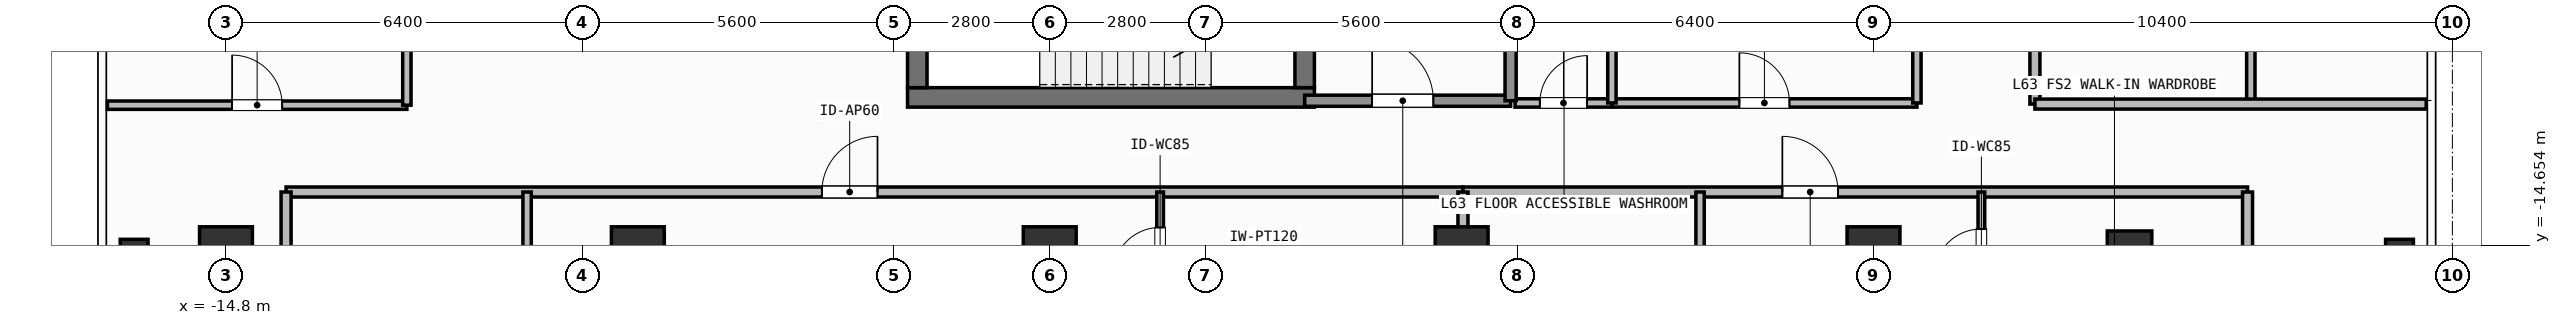
"""IFC4 building model, lengths in metres.
Left out: names, types, materials, properties, quantities, classifications, styles, units other than length and angle.
Written with IfcOpenShell. Run it as: python <this file> out.ifc"""

import sys

from ifc_helpers import new_model, si_unit, direction, frame, frame_2d, origin, origin_2d, place, context, subcontext, project, spatial, rectangle, hollow_rectangle, extrude, element, fill, save


model = new_model("IFC4")
c1 = context("Model", 3, precision=1e-05, world=origin(), true_north=direction((0.0, 1.0)))
c2 = subcontext(c1, "Body", "Model", "MODEL_VIEW")
j1 = project(units=[si_unit("LENGTHUNIT", "METRE"), si_unit("PLANEANGLEUNIT", "RADIAN")], contexts=[c1])
p1 = place(None, origin())
s1 = spatial("IfcSite", under=j1, at=p1, CompositionType="ELEMENT")
p2 = place(p1, origin())
s2 = spatial("IfcBuilding", under=s1, at=p2, CompositionType="ELEMENT")
p3 = place(p2, frame((0.0, 0.0, 258.6)))
s3 = spatial("IfcBuildingStorey", under=s2, at=p3, CompositionType="ELEMENT", Elevation=258.6)
p4 = place(p3, frame((-2.555, -12.0, 0.0), z_axis=(0.0, 0.0, 1.0), x_axis=(1.0, 0.0, 0.0)))
e1 = element("IfcWall", 1, at=p4, inside=s3, PredefinedType="SHEAR", context=c2, shape_type="SweptSolid", body=[
    extrude(rectangle(XDim=7.31, YDim=0.35, at=frame_2d((3.655, 0.0))), origin(), (0.0, 0.0, 1.0), 3.9),
])
p5 = place(p3, frame((-2.38, -11.825, 0.0), z_axis=(0.0, 0.0, 1.0), x_axis=(0.0, 1.0, 0.0)))
e2 = element("IfcWall", 2, at=p5, inside=s3, PredefinedType="SHEAR", context=c2, shape_type="SweptSolid", body=[
    extrude(rectangle(XDim=2.925, YDim=0.35, at=frame_2d((1.462, 0.0))), origin(), (0.0, 0.0, 1.0), 3.9),
])
p6 = place(p3, frame((4.58, -8.9, 0.0), z_axis=(0.0, 0.0, 1.0), x_axis=(0.0, -1.0, 0.0)))
e3 = element("IfcWall", 3, at=p6, inside=s3, PredefinedType="SHEAR", context=c2, shape_type="SweptSolid", body=[
    extrude(rectangle(XDim=2.925, YDim=0.35, at=frame_2d((1.462, 0.0))), origin(), (0.0, 0.0, 1.0), 3.9),
])
p7 = place(p6, frame((0.913, 0.0, 0.0)))
e4 = element("IfcOpeningElement", 4, at=p7, cuts=e3, PredefinedType="OPENING", context=c2, shape_type="SweptSolid", body=[
    extrude(rectangle(XDim=1.1, YDim=2.15, at=frame_2d((0.55, 1.075))), frame((0.0, 0.185, 0.0), z_axis=(0.0, -1.0, 0.0), x_axis=(1.0, 0.0, 0.0)), (0.0, 0.0, 1.0), 0.37),
])
for number, where, z_axis, x_axis in (
    (5, (-14.8, -14.8, 0.0), (0.0, 0.0, 1.0), (1.0, 0.0, 0.0)),
    (6, (-7.4, -14.8, 0.0), (0.0, 0.0, 1.0), (1.0, 0.0, 0.0)),
    (7, (0.0, -14.8, 0.0), (0.0, 0.0, 1.0), (1.0, 0.0, 0.0)),
    (8, (7.4, -14.8, 0.0), (0.0, 0.0, 1.0), (1.0, 0.0, 0.0)),
    (9, (14.8, -14.8, 0.0), (0.0, 0.0, 1.0), (1.0, 0.0, 0.0)),
):
    element("IfcColumn", number, at=place(p3, frame(where, z_axis=z_axis, x_axis=x_axis)), inside=s3, PredefinedType="COLUMN", context=c2, shape_type="SweptSolid", body=[
        extrude(rectangle(XDim=0.95, YDim=0.95, at=origin_2d()), origin(), (0.0, 0.0, 1.0), 3.9),
    ])
p8 = place(p3, frame((19.4, -14.8, 0.0), z_axis=(0.0, 0.0, 1.0), x_axis=(1.0, 0.0, 0.0)))
e10 = element("IfcColumn", 10, at=p8, inside=s3, PredefinedType="COLUMN", context=c2, shape_type="SweptSolid", body=[
    extrude(hollow_rectangle(XDim=0.8, YDim=0.8, WallThickness=0.036, at=origin_2d()), origin(), (0.0, 0.0, 1.0), 3.9),
])
for number, where, z_axis, x_axis in (
    (11, (-16.45, -14.8, 0.0), (0.0, 0.0, 1.0), (1.0, 0.0, 0.0)),
    (12, (24.25, -14.8, 0.0), (0.0, 0.0, 1.0), (1.0, 0.0, 0.0)),
):
    element("IfcColumn", number, at=place(p3, frame(where, z_axis=z_axis, x_axis=x_axis)), inside=s3, PredefinedType="COLUMN", context=c2, shape_type="SweptSolid", body=[
        extrude(hollow_rectangle(XDim=0.5, YDim=0.5, WallThickness=0.025, at=origin_2d()), origin(), (0.0, 0.0, 1.0), 3.9),
    ])
p9 = place(p3, frame((4.58, -12.06, 0.0), z_axis=(0.0, 0.0, 1.0), x_axis=(1.0, 0.0, 0.0)))
e13 = element("IfcWall", 13, at=p9, inside=s3, PredefinedType="SOLIDWALL", context=c2, shape_type="SweptSolid", body=[
    extrude(rectangle(XDim=3.7, YDim=0.2, at=frame_2d((1.85, 0.0))), origin(), (0.0, 0.0, 1.0), 3.68),
])
p10 = place(p9, frame((1.212, 0.0, 0.0)))
e14 = element("IfcOpeningElement", 14, at=p10, cuts=e13, PredefinedType="OPENING", context=c2, shape_type="SweptSolid", body=[
    extrude(rectangle(XDim=1.1, YDim=2.15, at=frame_2d((0.55, 1.075))), frame((0.0, 0.11, 0.0), z_axis=(0.0, -1.0, 0.0), x_axis=(1.0, 0.0, 0.0)), (0.0, 0.0, 1.0), 0.22),
])
p11 = place(p3, frame((8.36, -12.1, 0.0), z_axis=(0.0, 0.0, 1.0), x_axis=(1.0, 0.0, 0.0)))
e15 = element("IfcWall", 15, at=p11, inside=s3, PredefinedType="PARTITIONING", context=c2, shape_type="SweptSolid", body=[
    extrude(rectangle(XDim=1.74, YDim=0.15, at=frame_2d((0.87, 0.0))), origin(), (0.0, 0.0, 1.0), 3.68),
])
p12 = place(p11, frame((0.445, 0.0, 0.0)))
e16 = element("IfcOpeningElement", 16, at=p12, cuts=e15, PredefinedType="OPENING", context=c2, shape_type="SweptSolid", body=[
    extrude(rectangle(XDim=0.85, YDim=2.1, at=frame_2d((0.425, 1.05))), frame((0.0, 0.085, 0.0), z_axis=(0.0, -1.0, 0.0), x_axis=(1.0, 0.0, 0.0)), (0.0, 0.0, 1.0), 0.17),
])
p13 = place(p3, frame((10.1, -12.1, 0.0), z_axis=(0.0, 0.0, 1.0), x_axis=(1.0, 0.0, 0.0)))
e17 = element("IfcWall", 17, at=p13, inside=s3, PredefinedType="PARTITIONING", context=c2, shape_type="SweptSolid", body=[
    extrude(rectangle(XDim=5.48, YDim=0.15, at=frame_2d((2.74, 0.0))), origin(), (0.0, 0.0, 1.0), 3.68),
])
p14 = place(p13, frame((2.29, 0.0, 0.0)))
e18 = element("IfcOpeningElement", 18, at=p14, cuts=e17, PredefinedType="OPENING", context=c2, shape_type="SweptSolid", body=[
    extrude(rectangle(XDim=0.9, YDim=2.1, at=frame_2d((0.45, 1.05))), frame((0.0, 0.085, 0.0), z_axis=(0.0, -1.0, 0.0), x_axis=(1.0, 0.0, 0.0)), (0.0, 0.0, 1.0), 0.17),
])
p15 = place(p3, frame((-13.72, -13.7, 0.0), z_axis=(0.0, 0.0, 1.0), x_axis=(1.0, 0.0, 0.0)))
e19 = element("IfcWall", 19, at=p15, inside=s3, PredefinedType="PARTITIONING", context=c2, shape_type="SweptSolid", body=[
    extrude(rectangle(XDim=21.144, YDim=0.18, at=frame_2d((10.572, 0.0))), origin(), (0.0, 0.0, 1.0), 3.68),
])
p16 = place(p15, frame((9.625, 0.0, 0.0)))
e20 = element("IfcOpeningElement", 20, at=p16, cuts=e19, PredefinedType="OPENING", context=c2, shape_type="SweptSolid", body=[
    extrude(rectangle(XDim=1.0, YDim=2.2, at=frame_2d((0.5, 1.1))), frame((0.0, 0.1, 0.0), z_axis=(0.0, -1.0, 0.0), x_axis=(1.0, 0.0, 0.0)), (0.0, 0.0, 1.0), 0.2),
])
p17 = place(p3, frame((-9.39, -17.59, 0.0), z_axis=(0.0, 0.0, 1.0), x_axis=(0.0, 1.0, 0.0)))
e21 = element("IfcWall", 21, at=p17, inside=s3, PredefinedType="PARTITIONING", context=c2, shape_type="SweptSolid", body=[
    extrude(rectangle(XDim=3.89, YDim=0.15, at=frame_2d((1.945, 0.0))), origin(), (0.0, 0.0, 1.0), 3.68),
])
p18 = place(p17, frame((1.52, 0.0, 0.0)))
e22 = element("IfcOpeningElement", 22, at=p18, cuts=e21, PredefinedType="OPENING", context=c2, shape_type="SweptSolid", body=[
    extrude(rectangle(XDim=0.85, YDim=2.1, at=frame_2d((0.425, 1.05))), frame((0.0, 0.085, 0.0), z_axis=(0.0, -1.0, 0.0), x_axis=(1.0, 0.0, 0.0)), (0.0, 0.0, 1.0), 0.17),
])
p19 = place(p3, frame((1.983, -15.983, 0.0), z_axis=(0.0, 0.0, 1.0), x_axis=(0.0, 1.0, 0.0)))
e23 = element("IfcWall", 23, at=p19, inside=s3, PredefinedType="PARTITIONING", context=c2, shape_type="SweptSolid", body=[
    extrude(rectangle(XDim=2.283, YDim=0.12, at=frame_2d((1.142, 0.0))), origin(), (0.0, 0.0, 1.0), 3.68),
])
p20 = place(p19, frame((0.796, 0.0, 0.0)))
e24 = element("IfcOpeningElement", 24, at=p20, cuts=e23, PredefinedType="OPENING", context=c2, shape_type="SweptSolid", body=[
    extrude(rectangle(XDim=0.85, YDim=2.1, at=frame_2d((0.425, 1.05))), frame((0.0, 0.07, 0.0), z_axis=(0.0, -1.0, 0.0), x_axis=(1.0, 0.0, 0.0)), (0.0, 0.0, 1.0), 0.14),
])
p21 = place(p3, frame((7.424, -13.7, 0.0), z_axis=(0.0, 0.0, 1.0), x_axis=(1.0, 0.0, 0.0)))
e25 = element("IfcWall", 25, at=p21, inside=s3, PredefinedType="PARTITIONING", context=c2, shape_type="SweptSolid", body=[
    extrude(rectangle(XDim=14.096, YDim=0.18, at=frame_2d((7.048, 0.0))), origin(), (0.0, 0.0, 1.0), 3.68),
])
p22 = place(p21, frame((5.738, 0.0, 0.0)))
e26 = element("IfcOpeningElement", 26, at=p22, cuts=e25, PredefinedType="OPENING", context=c2, shape_type="SweptSolid", body=[
    extrude(rectangle(XDim=1.0, YDim=2.2, at=frame_2d((0.5, 1.1))), frame((0.0, 0.1, 0.0), z_axis=(0.0, -1.0, 0.0), x_axis=(1.0, 0.0, 0.0)), (0.0, 0.0, 1.0), 0.2),
])
p23 = place(p3, frame((11.684, -17.59, 0.0), z_axis=(0.0, 0.0, 1.0), x_axis=(0.0, 1.0, 0.0)))
e27 = element("IfcWall", 27, at=p23, inside=s3, PredefinedType="PARTITIONING", context=c2, shape_type="SweptSolid", body=[
    extrude(rectangle(XDim=3.89, YDim=0.15, at=frame_2d((1.945, 0.0))), origin(), (0.0, 0.0, 1.0), 3.68),
])
p24 = place(p23, frame((1.52, 0.0, 0.0)))
e28 = element("IfcOpeningElement", 28, at=p24, cuts=e27, PredefinedType="OPENING", context=c2, shape_type="SweptSolid", body=[
    extrude(rectangle(XDim=0.85, YDim=2.1, at=frame_2d((0.425, 1.05))), frame((0.0, 0.085, 0.0), z_axis=(0.0, -1.0, 0.0), x_axis=(1.0, 0.0, 0.0)), (0.0, 0.0, 1.0), 0.17),
])
p25 = place(p3, frame((16.738, -15.878, 0.0), z_axis=(0.0, 0.0, 1.0), x_axis=(0.0, 1.0, 0.0)))
e29 = element("IfcWall", 29, at=p25, inside=s3, PredefinedType="PARTITIONING", context=c2, shape_type="SweptSolid", body=[
    extrude(rectangle(XDim=2.178, YDim=0.12, at=frame_2d((1.089, 0.0))), origin(), (0.0, 0.0, 1.0), 3.68),
])
p26 = place(p25, frame((0.664, 0.0, 0.0)))
e30 = element("IfcOpeningElement", 30, at=p26, cuts=e29, PredefinedType="OPENING", context=c2, shape_type="SweptSolid", body=[
    extrude(rectangle(XDim=0.85, YDim=2.1, at=frame_2d((0.425, 1.05))), frame((0.0, 0.07, 0.0), z_axis=(0.0, -1.0, 0.0), x_axis=(1.0, 0.0, 0.0)), (0.0, 0.0, 1.0), 0.14),
])
p27 = place(p3, frame((-16.93, -12.14, 0.0), z_axis=(0.0, 0.0, 1.0), x_axis=(1.0, 0.0, 0.0)))
e31 = element("IfcWall", 31, at=p27, inside=s3, PredefinedType="PARTITIONING", context=c2, shape_type="SweptSolid", body=[
    extrude(rectangle(XDim=5.38, YDim=0.15, at=frame_2d((2.69, 0.0))), origin(), (0.0, 0.0, 1.0), 3.68),
])
p28 = place(p27, frame((2.24, 0.0, 0.0)))
e32 = element("IfcOpeningElement", 32, at=p28, cuts=e31, PredefinedType="OPENING", context=c2, shape_type="SweptSolid", body=[
    extrude(rectangle(XDim=0.9, YDim=2.1, at=frame_2d((0.45, 1.05))), frame((0.0, 0.085, 0.0), z_axis=(0.0, -1.0, 0.0), x_axis=(1.0, 0.0, 0.0)), (0.0, 0.0, 1.0), 0.17),
])
p29 = place(p3, frame((17.7, -12.12, 0.0), z_axis=(0.0, 0.0, 1.0), x_axis=(0.0, 1.0, 0.0)))
e33 = element("IfcWall", 33, at=p29, inside=s3, PredefinedType="PARTITIONING", context=c2, shape_type="SweptSolid", body=[
    extrude(rectangle(XDim=13.574, YDim=0.18, at=frame_2d((6.787, 0.0))), origin(), (0.0, 0.0, 1.0), 3.68),
])
p30 = place(p29, frame((5.665, 0.0, 0.0)))
e34 = element("IfcOpeningElement", 34, at=p30, cuts=e33, PredefinedType="OPENING", context=c2, shape_type="SweptSolid", body=[
    extrude(rectangle(XDim=1.0, YDim=2.2, at=frame_2d((0.5, 1.1))), frame((0.0, 0.1, 0.0), z_axis=(0.0, -1.0, 0.0), x_axis=(1.0, 0.0, 0.0)), (0.0, 0.0, 1.0), 0.2),
])
p31 = place(p3, frame((8.28, -12.06, 0.0), z_axis=(0.0, 0.0, 1.0), x_axis=(0.0, 1.0, 0.0)))
e35 = element("IfcWall", 35, at=p31, inside=s3, PredefinedType="SOLIDWALL", context=c2, shape_type="SweptSolid", body=[
    extrude(rectangle(XDim=3.335, YDim=0.2, at=frame_2d((1.667, 0.0))), origin(), (0.0, 0.0, 1.0), 3.68),
])
p32 = place(p3, frame((10.1, -12.1, 0.0), z_axis=(0.0, 0.0, 1.0), x_axis=(0.0, 1.0, 0.0)))
e36 = element("IfcWall", 36, at=p32, inside=s3, PredefinedType="PARTITIONING", context=c2, shape_type="SweptSolid", body=[
    extrude(rectangle(XDim=2.35, YDim=0.15, at=frame_2d((1.175, 0.0))), origin(), (0.0, 0.0, 1.0), 3.68),
])
p33 = place(p3, frame((15.58, -12.1, 0.0), z_axis=(0.0, 0.0, 1.0), x_axis=(0.0, 1.0, 0.0)))
e37 = element("IfcWall", 37, at=p33, inside=s3, PredefinedType="PARTITIONING", context=c2, shape_type="SweptSolid", body=[
    extrude(rectangle(XDim=6.25, YDim=0.15, at=frame_2d((3.125, 0.0))), origin(), (0.0, 0.0, 1.0), 3.68),
])
for number, where, z_axis, x_axis in (
    (38, (-13.72, -19.51, 0.0), (0.0, 0.0, 1.0), (0.0, 1.0, 0.0)),
    (39, (21.52, -19.51, 0.0), (0.0, 0.0, 1.0), (0.0, 1.0, 0.0)),
):
    element("IfcWall", number, at=place(p3, frame(where, z_axis=z_axis, x_axis=x_axis)), inside=s3, PredefinedType="PARTITIONING", context=c2, shape_type="SweptSolid", body=[
        extrude(rectangle(XDim=5.81, YDim=0.18, at=frame_2d((2.905, 0.0))), origin(), (0.0, 0.0, 1.0), 3.68),
    ])
p34 = place(p3, frame((7.424, -20.63, 0.0), z_axis=(0.0, 0.0, 1.0), x_axis=(0.0, 1.0, 0.0)))
e40 = element("IfcWall", 40, at=p34, inside=s3, PredefinedType="PARTITIONING", context=c2, shape_type="SweptSolid", body=[
    extrude(rectangle(XDim=6.93, YDim=0.18, at=frame_2d((3.465, 0.0))), origin(), (0.0, 0.0, 1.0), 3.182),
])
p35 = place(p3, frame((-11.55, -12.14, 0.0), z_axis=(0.0, 0.0, 1.0), x_axis=(0.0, 1.0, 0.0)))
e41 = element("IfcWall", 41, at=p35, inside=s3, PredefinedType="PARTITIONING", context=c2, shape_type="SweptSolid", body=[
    extrude(rectangle(XDim=13.94, YDim=0.15, at=frame_2d((6.97, 0.0))), origin(), (0.0, 0.0, 1.0), 3.68),
])
p36 = place(p3, frame((21.579, -12.12, 0.0), z_axis=(0.0, 0.0, 1.0), x_axis=(0.0, 1.0, 0.0)))
e42 = element("IfcWall", 42, at=p36, inside=s3, PredefinedType="PARTITIONING", context=c2, shape_type="SweptSolid", body=[
    extrude(rectangle(XDim=3.493, YDim=0.15, at=frame_2d((1.747, 0.0))), origin(), (0.0, 0.0, 1.0), 3.68),
])
p37 = place(p3, frame((17.7, -12.12, 0.0), z_axis=(0.0, 0.0, 1.0), x_axis=(1.0, 0.0, 0.0)))
e43 = element("IfcWall", 43, at=p37, inside=s3, PredefinedType="PARTITIONING", context=c2, shape_type="SweptSolid", body=[
    extrude(rectangle(XDim=7.03, YDim=0.18, at=frame_2d((3.515, 0.0))), origin(), (0.0, 0.0, 1.0), 3.68),
])
p38 = place(p10, origin())
e44 = element("IfcDoor", 44, at=p38, inside=s3, OperationType="SINGLE_SWING_LEFT", PredefinedType="DOOR", context=c2, shape_type="SweptSolid", body=[
    extrude(rectangle(XDim=1.1, YDim=2.15, at=frame_2d((0.55, 1.075))), frame((0.0, 0.025, 0.0), z_axis=(0.0, -1.0, 0.0), x_axis=(1.0, 0.0, 0.0)), (0.0, 0.0, 1.0), 0.05),
])
fill(e14, e44)
p39 = place(p12, origin())
e45 = element("IfcDoor", 45, at=p39, inside=s3, OperationType="SINGLE_SWING_RIGHT", PredefinedType="DOOR", context=c2, shape_type="SweptSolid", body=[
    extrude(rectangle(XDim=0.85, YDim=2.1, at=frame_2d((0.425, 1.05))), frame((0.0, 0.025, 0.0), z_axis=(0.0, -1.0, 0.0), x_axis=(1.0, 0.0, 0.0)), (0.0, 0.0, 1.0), 0.05),
])
fill(e16, e45)
p40 = place(p14, origin())
e46 = element("IfcDoor", 46, at=p40, inside=s3, OperationType="SINGLE_SWING_LEFT", PredefinedType="DOOR", context=c2, shape_type="SweptSolid", body=[
    extrude(rectangle(XDim=0.9, YDim=2.1, at=frame_2d((0.45, 1.05))), frame((0.0, 0.025, 0.0), z_axis=(0.0, -1.0, 0.0), x_axis=(1.0, 0.0, 0.0)), (0.0, 0.0, 1.0), 0.05),
])
fill(e18, e46)
p41 = place(p16, origin())
e47 = element("IfcDoor", 47, at=p41, inside=s3, OperationType="SINGLE_SWING_RIGHT", PredefinedType="DOOR", context=c2, shape_type="SweptSolid", body=[
    extrude(rectangle(XDim=1.0, YDim=2.2, at=frame_2d((0.5, 1.1))), frame((0.0, 0.025, 0.0), z_axis=(0.0, -1.0, 0.0), x_axis=(1.0, 0.0, 0.0)), (0.0, 0.0, 1.0), 0.05),
])
fill(e20, e47)
p42 = place(p20, origin())
e48 = element("IfcDoor", 48, at=p42, inside=s3, OperationType="SINGLE_SWING_LEFT", PredefinedType="DOOR", context=c2, shape_type="SweptSolid", body=[
    extrude(rectangle(XDim=0.85, YDim=2.1, at=frame_2d((0.425, 1.05))), frame((0.0, 0.025, 0.0), z_axis=(0.0, -1.0, 0.0), x_axis=(1.0, 0.0, 0.0)), (0.0, 0.0, 1.0), 0.05),
])
fill(e24, e48)
p43 = place(p22, origin())
e49 = element("IfcDoor", 49, at=p43, inside=s3, OperationType="SINGLE_SWING_LEFT", PredefinedType="DOOR", context=c2, shape_type="SweptSolid", body=[
    extrude(rectangle(XDim=1.0, YDim=2.2, at=frame_2d((0.5, 1.1))), frame((0.0, 0.025, 0.0), z_axis=(0.0, -1.0, 0.0), x_axis=(1.0, 0.0, 0.0)), (0.0, 0.0, 1.0), 0.05),
])
fill(e26, e49)
p44 = place(p26, origin())
e50 = element("IfcDoor", 50, at=p44, inside=s3, OperationType="SINGLE_SWING_LEFT", PredefinedType="DOOR", context=c2, shape_type="SweptSolid", body=[
    extrude(rectangle(XDim=0.85, YDim=2.1, at=frame_2d((0.425, 1.05))), frame((0.0, 0.025, 0.0), z_axis=(0.0, -1.0, 0.0), x_axis=(1.0, 0.0, 0.0)), (0.0, 0.0, 1.0), 0.05),
])
fill(e30, e50)
p45 = place(p28, origin())
e51 = element("IfcDoor", 51, at=p45, inside=s3, OperationType="SINGLE_SWING_LEFT", PredefinedType="DOOR", context=c2, shape_type="SweptSolid", body=[
    extrude(rectangle(XDim=0.9, YDim=2.1, at=frame_2d((0.45, 1.05))), frame((0.0, 0.025, 0.0), z_axis=(0.0, -1.0, 0.0), x_axis=(1.0, 0.0, 0.0)), (0.0, 0.0, 1.0), 0.05),
])
fill(e32, e51)
save(model, sys.argv[1])
